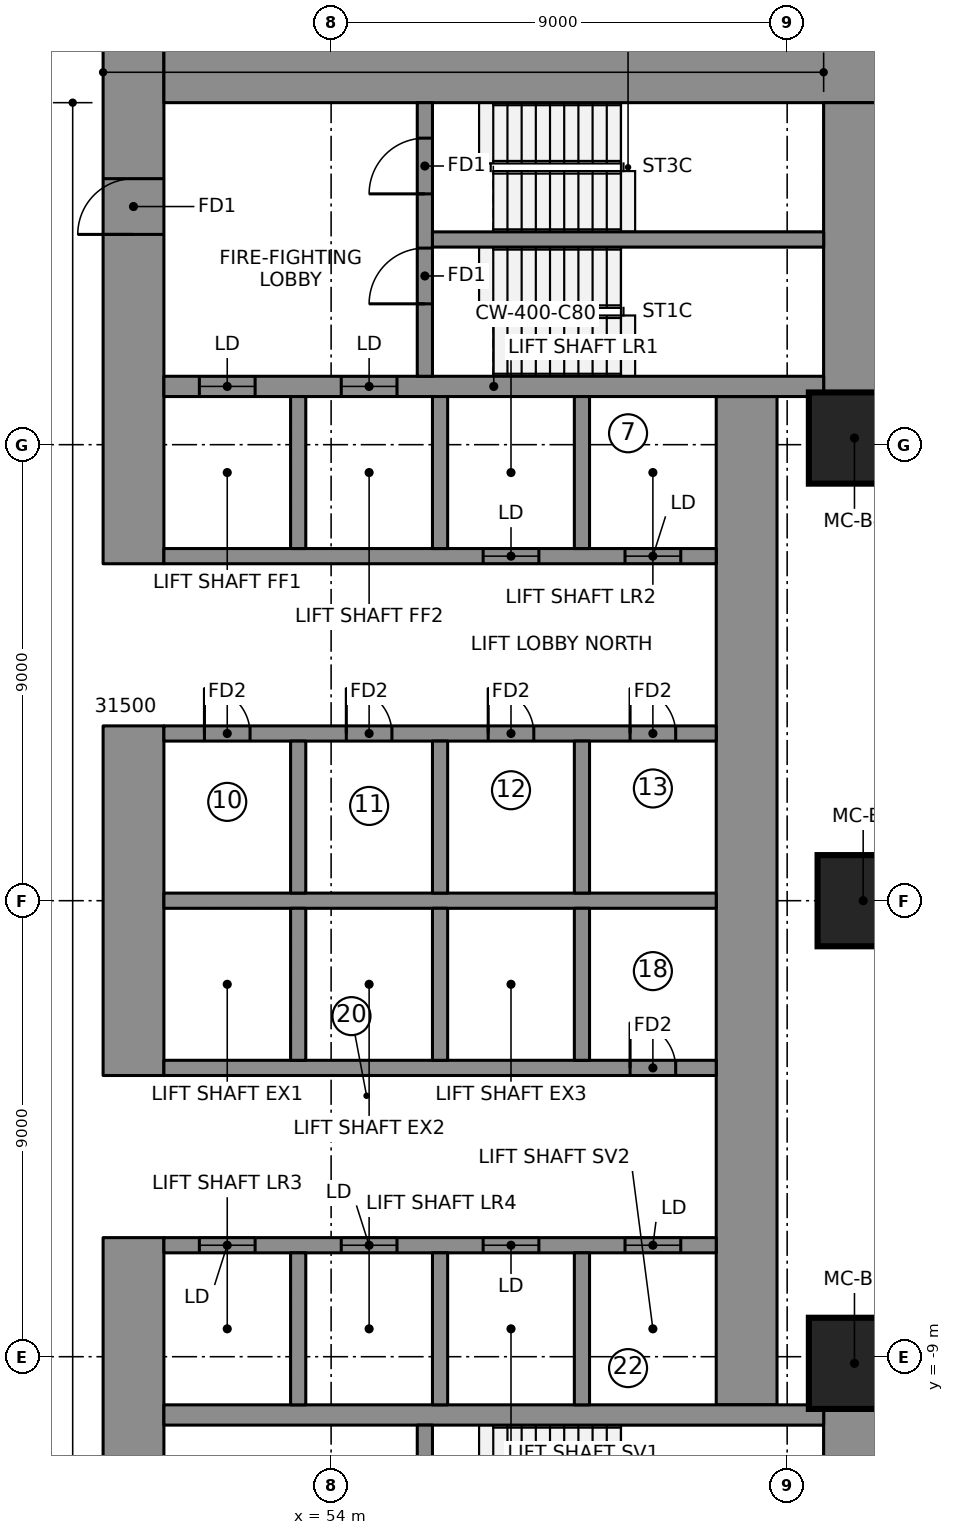
"""IFC4 building model, lengths in metres.
Left out: names, types, materials, properties, quantities, classifications, styles, units other than length and angle.
Written with IfcOpenShell. Run it as: python <this file> out.ifc"""

import sys

from ifc_helpers import new_model, si_unit, direction, frame, frame_2d, origin, origin_2d, place, context, subcontext, project, spatial, rectangle, extrude, element, fill, save


model = new_model("IFC4")
c1 = context("Model", 3, precision=1e-05, world=origin(), true_north=direction((0.0, 1.0)))
c2 = subcontext(c1, "Body", "Model", "MODEL_VIEW")
j1 = project(units=[si_unit("LENGTHUNIT", "METRE"), si_unit("PLANEANGLEUNIT", "RADIAN")], contexts=[c1])
p1 = place(None, origin())
s1 = spatial("IfcSite", under=j1, at=p1, CompositionType="ELEMENT")
p2 = place(p1, origin())
s2 = spatial("IfcBuilding", under=s1, at=p2, CompositionType="ELEMENT")
p3 = place(p2, frame((0.0, 0.0, 60.9)))
s3 = spatial("IfcBuildingStorey", under=s2, at=p3, CompositionType="ELEMENT", Elevation=60.9)
p4 = place(p3, frame((50.1, 6.65, 0.0), z_axis=(0.0, 0.0, 1.0), x_axis=(0.0, 1.0, 0.0)))
e1 = element("IfcWall", 1, at=p4, inside=s3, PredefinedType="SHEAR", context=c2, shape_type="SweptSolid", body=[
    extrude(rectangle(XDim=10.3, YDim=1.2, at=frame_2d((5.15, 0.0))), origin(), (0.0, 0.0, 1.0), 3.55),
])
p5 = place(p4, frame((6.5, 0.0, 0.0)))
e2 = element("IfcOpeningElement", 2, at=p5, cuts=e1, PredefinedType="OPENING", context=c2, shape_type="SweptSolid", body=[
    extrude(rectangle(XDim=1.1, YDim=2.1, at=frame_2d((0.55, 1.05))), frame((0.0, 0.61, 0.0), z_axis=(0.0, -1.0, 0.0), x_axis=(1.0, 0.0, 0.0)), (0.0, 0.0, 1.0), 1.22),
])
p6 = place(p3, frame((50.1, -3.45, 0.0), z_axis=(0.0, 0.0, 1.0), x_axis=(0.0, 1.0, 0.0)))
e3 = element("IfcWall", 3, at=p6, inside=s3, PredefinedType="SHEAR", context=c2, shape_type="SweptSolid", body=[
    extrude(rectangle(XDim=6.9, YDim=1.2, at=frame_2d((3.45, 0.0))), origin(), (0.0, 0.0, 1.0), 3.55),
])
p7 = place(p3, frame((50.1, -16.95, 0.0), z_axis=(0.0, 0.0, 1.0), x_axis=(0.0, 1.0, 0.0)))
e4 = element("IfcWall", 4, at=p7, inside=s3, PredefinedType="SHEAR", context=c2, shape_type="SweptSolid", body=[
    extrude(rectangle(XDim=10.3, YDim=1.2, at=frame_2d((5.15, 0.0))), origin(), (0.0, 0.0, 1.0), 3.55),
])
p8 = place(p7, frame((2.7, 0.0, 0.0)))
e5 = element("IfcOpeningElement", 5, at=p8, cuts=e4, PredefinedType="OPENING", context=c2, shape_type="SweptSolid", body=[
    extrude(rectangle(XDim=1.1, YDim=2.1, at=frame_2d((0.55, 1.05))), frame((0.0, 0.61, 0.0), z_axis=(0.0, -1.0, 0.0), x_axis=(1.0, 0.0, 0.0)), (0.0, 0.0, 1.0), 1.22),
])
p9 = place(p3, frame((50.7, 16.35, 0.0), z_axis=(0.0, 0.0, 1.0), x_axis=(1.0, 0.0, 0.0)))
e6 = element("IfcWall", 6, at=p9, inside=s3, PredefinedType="SHEAR", context=c2, shape_type="SweptSolid", body=[
    extrude(rectangle(XDim=14.22, YDim=1.2, at=frame_2d((7.11, 0.0))), origin(), (0.0, 0.0, 1.0), 3.55),
])
for number, where, z_axis, x_axis in (
    (7, (64.32, 9.95, 0.0), (0.0, 0.0, 1.0), (0.0, 1.0, 0.0)),
    (8, (64.32, -15.75, 0.0), (0.0, 0.0, 1.0), (0.0, 1.0, 0.0)),
):
    element("IfcWall", number, at=place(p3, frame(where, z_axis=z_axis, x_axis=x_axis)), inside=s3, PredefinedType="SHEAR", context=c2, shape_type="SweptSolid", body=[
        extrude(rectangle(XDim=5.8, YDim=1.2, at=frame_2d((2.9, 0.0))), origin(), (0.0, 0.0, 1.0), 3.55),
    ])
p10 = place(p3, frame((62.2, -9.95, 0.0), z_axis=(0.0, 0.0, 1.0), x_axis=(0.0, 1.0, 0.0)))
e9 = element("IfcWall", 9, at=p10, inside=s3, PredefinedType="SHEAR", context=c2, shape_type="SweptSolid", body=[
    extrude(rectangle(XDim=19.9, YDim=1.2, at=frame_2d((9.95, 0.0))), origin(), (0.0, 0.0, 1.0), 3.55),
])
p11 = place(p3, frame((50.7, 10.15, 0.0), z_axis=(0.0, 0.0, 1.0), x_axis=(1.0, 0.0, 0.0)))
e10 = element("IfcWall", 10, at=p11, inside=s3, PredefinedType="SHEAR", context=c2, shape_type="SweptSolid", body=[
    extrude(rectangle(XDim=13.02, YDim=0.4, at=frame_2d((6.51, 0.0))), origin(), (0.0, 0.0, 1.0), 3.55),
])
p12 = place(p11, frame((0.7, 0.0, 0.0)))
e11 = element("IfcOpeningElement", 11, at=p12, cuts=e10, PredefinedType="OPENING", context=c2, shape_type="SweptSolid", body=[
    extrude(rectangle(XDim=1.1, YDim=2.1, at=frame_2d((0.55, 1.05))), frame((0.0, 0.21, 0.0), z_axis=(0.0, -1.0, 0.0), x_axis=(1.0, 0.0, 0.0)), (0.0, 0.0, 1.0), 0.42),
])
p13 = place(p11, frame((3.5, 0.0, 0.0)))
e12 = element("IfcOpeningElement", 12, at=p13, cuts=e10, PredefinedType="OPENING", context=c2, shape_type="SweptSolid", body=[
    extrude(rectangle(XDim=1.1, YDim=2.1, at=frame_2d((0.55, 1.05))), frame((0.0, 0.21, 0.0), z_axis=(0.0, -1.0, 0.0), x_axis=(1.0, 0.0, 0.0)), (0.0, 0.0, 1.0), 0.42),
])
p14 = place(p3, frame((50.7, -10.15, 0.0), z_axis=(0.0, 0.0, 1.0), x_axis=(1.0, 0.0, 0.0)))
e13 = element("IfcWall", 13, at=p14, inside=s3, PredefinedType="SHEAR", context=c2, shape_type="SweptSolid", body=[
    extrude(rectangle(XDim=13.02, YDim=0.4, at=frame_2d((6.51, 0.0))), origin(), (0.0, 0.0, 1.0), 3.55),
])
p15 = place(p3, frame((50.7, 0.0, 0.0), z_axis=(0.0, 0.0, 1.0), x_axis=(1.0, 0.0, 0.0)))
e14 = element("IfcWall", 14, at=p15, inside=s3, PredefinedType="SHEAR", context=c2, shape_type="SweptSolid", body=[
    extrude(rectangle(XDim=10.9, YDim=0.3, at=frame_2d((5.45, 0.0))), origin(), (0.0, 0.0, 1.0), 3.55),
])
p16 = place(p3, frame((50.7, 3.3, 0.0), z_axis=(0.0, 0.0, 1.0), x_axis=(1.0, 0.0, 0.0)))
e15 = element("IfcWall", 15, at=p16, inside=s3, PredefinedType="SHEAR", context=c2, shape_type="SweptSolid", body=[
    extrude(rectangle(XDim=10.9, YDim=0.3, at=frame_2d((5.45, 0.0))), origin(), (0.0, 0.0, 1.0), 3.55),
])
p17 = place(p16, frame((0.8, 0.0, 0.0)))
e16 = element("IfcOpeningElement", 16, at=p17, cuts=e15, PredefinedType="OPENING", context=c2, shape_type="SweptSolid", body=[
    extrude(rectangle(XDim=0.9, YDim=2.1, at=frame_2d((0.45, 1.05))), frame((0.0, 0.16, 0.0), z_axis=(0.0, -1.0, 0.0), x_axis=(1.0, 0.0, 0.0)), (0.0, 0.0, 1.0), 0.32),
])
p18 = place(p16, frame((3.6, 0.0, 0.0)))
e17 = element("IfcOpeningElement", 17, at=p18, cuts=e15, PredefinedType="OPENING", context=c2, shape_type="SweptSolid", body=[
    extrude(rectangle(XDim=0.9, YDim=2.1, at=frame_2d((0.45, 1.05))), frame((0.0, 0.16, 0.0), z_axis=(0.0, -1.0, 0.0), x_axis=(1.0, 0.0, 0.0)), (0.0, 0.0, 1.0), 0.32),
])
p19 = place(p16, frame((6.4, 0.0, 0.0)))
e18 = element("IfcOpeningElement", 18, at=p19, cuts=e15, PredefinedType="OPENING", context=c2, shape_type="SweptSolid", body=[
    extrude(rectangle(XDim=0.9, YDim=2.1, at=frame_2d((0.45, 1.05))), frame((0.0, 0.16, 0.0), z_axis=(0.0, -1.0, 0.0), x_axis=(1.0, 0.0, 0.0)), (0.0, 0.0, 1.0), 0.32),
])
p20 = place(p16, frame((9.2, 0.0, 0.0)))
e19 = element("IfcOpeningElement", 19, at=p20, cuts=e15, PredefinedType="OPENING", context=c2, shape_type="SweptSolid", body=[
    extrude(rectangle(XDim=0.9, YDim=2.1, at=frame_2d((0.45, 1.05))), frame((0.0, 0.16, 0.0), z_axis=(0.0, -1.0, 0.0), x_axis=(1.0, 0.0, 0.0)), (0.0, 0.0, 1.0), 0.32),
])
p21 = place(p3, frame((50.7, 6.8, 0.0), z_axis=(0.0, 0.0, 1.0), x_axis=(1.0, 0.0, 0.0)))
e20 = element("IfcWall", 20, at=p21, inside=s3, PredefinedType="SHEAR", context=c2, shape_type="SweptSolid", body=[
    extrude(rectangle(XDim=10.9, YDim=0.3, at=frame_2d((5.45, 0.0))), origin(), (0.0, 0.0, 1.0), 3.55),
])
p22 = place(p21, frame((6.3, 0.0, 0.0)))
e21 = element("IfcOpeningElement", 21, at=p22, cuts=e20, PredefinedType="OPENING", context=c2, shape_type="SweptSolid", body=[
    extrude(rectangle(XDim=1.1, YDim=2.1, at=frame_2d((0.55, 1.05))), frame((0.0, 0.16, 0.0), z_axis=(0.0, -1.0, 0.0), x_axis=(1.0, 0.0, 0.0)), (0.0, 0.0, 1.0), 0.32),
])
p23 = place(p21, frame((9.1, 0.0, 0.0)))
e22 = element("IfcOpeningElement", 22, at=p23, cuts=e20, PredefinedType="OPENING", context=c2, shape_type="SweptSolid", body=[
    extrude(rectangle(XDim=1.1, YDim=2.1, at=frame_2d((0.55, 1.05))), frame((0.0, 0.16, 0.0), z_axis=(0.0, -1.0, 0.0), x_axis=(1.0, 0.0, 0.0)), (0.0, 0.0, 1.0), 0.32),
])
for number, where, z_axis, x_axis in (
    (23, (53.35, 0.15, 0.0), (0.0, 0.0, 1.0), (0.0, 1.0, 0.0)),
    (24, (53.35, 6.95, 0.0), (0.0, 0.0, 1.0), (0.0, 1.0, 0.0)),
    (25, (56.15, 0.15, 0.0), (0.0, 0.0, 1.0), (0.0, 1.0, 0.0)),
    (26, (56.15, 6.95, 0.0), (0.0, 0.0, 1.0), (0.0, 1.0, 0.0)),
    (27, (58.95, 0.15, 0.0), (0.0, 0.0, 1.0), (0.0, 1.0, 0.0)),
    (28, (58.95, 6.95, 0.0), (0.0, 0.0, 1.0), (0.0, 1.0, 0.0)),
):
    element("IfcWall", number, at=place(p3, frame(where, z_axis=z_axis, x_axis=x_axis)), inside=s3, PredefinedType="SHEAR", context=c2, shape_type="SweptSolid", body=[
        extrude(rectangle(XDim=3.0, YDim=0.3, at=frame_2d((1.5, 0.0))), origin(), (0.0, 0.0, 1.0), 3.55),
    ])
p24 = place(p3, frame((50.7, -3.3, 0.0), z_axis=(0.0, 0.0, 1.0), x_axis=(1.0, 0.0, 0.0)))
e29 = element("IfcWall", 29, at=p24, inside=s3, PredefinedType="SHEAR", context=c2, shape_type="SweptSolid", body=[
    extrude(rectangle(XDim=10.9, YDim=0.3, at=frame_2d((5.45, 0.0))), origin(), (0.0, 0.0, 1.0), 3.55),
])
p25 = place(p24, frame((9.2, 0.0, 0.0)))
e30 = element("IfcOpeningElement", 30, at=p25, cuts=e29, PredefinedType="OPENING", context=c2, shape_type="SweptSolid", body=[
    extrude(rectangle(XDim=0.9, YDim=2.1, at=frame_2d((0.45, 1.05))), frame((0.0, 0.16, 0.0), z_axis=(0.0, -1.0, 0.0), x_axis=(1.0, 0.0, 0.0)), (0.0, 0.0, 1.0), 0.32),
])
p26 = place(p3, frame((50.7, -6.8, 0.0), z_axis=(0.0, 0.0, 1.0), x_axis=(1.0, 0.0, 0.0)))
e31 = element("IfcWall", 31, at=p26, inside=s3, PredefinedType="SHEAR", context=c2, shape_type="SweptSolid", body=[
    extrude(rectangle(XDim=10.9, YDim=0.3, at=frame_2d((5.45, 0.0))), origin(), (0.0, 0.0, 1.0), 3.55),
])
p27 = place(p26, frame((0.7, 0.0, 0.0)))
e32 = element("IfcOpeningElement", 32, at=p27, cuts=e31, PredefinedType="OPENING", context=c2, shape_type="SweptSolid", body=[
    extrude(rectangle(XDim=1.1, YDim=2.1, at=frame_2d((0.55, 1.05))), frame((0.0, 0.16, 0.0), z_axis=(0.0, -1.0, 0.0), x_axis=(1.0, 0.0, 0.0)), (0.0, 0.0, 1.0), 0.32),
])
p28 = place(p26, frame((3.5, 0.0, 0.0)))
e33 = element("IfcOpeningElement", 33, at=p28, cuts=e31, PredefinedType="OPENING", context=c2, shape_type="SweptSolid", body=[
    extrude(rectangle(XDim=1.1, YDim=2.1, at=frame_2d((0.55, 1.05))), frame((0.0, 0.16, 0.0), z_axis=(0.0, -1.0, 0.0), x_axis=(1.0, 0.0, 0.0)), (0.0, 0.0, 1.0), 0.32),
])
p29 = place(p26, frame((6.3, 0.0, 0.0)))
e34 = element("IfcOpeningElement", 34, at=p29, cuts=e31, PredefinedType="OPENING", context=c2, shape_type="SweptSolid", body=[
    extrude(rectangle(XDim=1.1, YDim=2.1, at=frame_2d((0.55, 1.05))), frame((0.0, 0.16, 0.0), z_axis=(0.0, -1.0, 0.0), x_axis=(1.0, 0.0, 0.0)), (0.0, 0.0, 1.0), 0.32),
])
p30 = place(p26, frame((9.1, 0.0, 0.0)))
e35 = element("IfcOpeningElement", 35, at=p30, cuts=e31, PredefinedType="OPENING", context=c2, shape_type="SweptSolid", body=[
    extrude(rectangle(XDim=1.1, YDim=2.1, at=frame_2d((0.55, 1.05))), frame((0.0, 0.16, 0.0), z_axis=(0.0, -1.0, 0.0), x_axis=(1.0, 0.0, 0.0)), (0.0, 0.0, 1.0), 0.32),
])
for number, where, z_axis, x_axis in (
    (36, (53.35, -3.15, 0.0), (0.0, 0.0, 1.0), (0.0, 1.0, 0.0)),
    (37, (53.35, -9.95, 0.0), (0.0, 0.0, 1.0), (0.0, 1.0, 0.0)),
    (38, (56.15, -3.15, 0.0), (0.0, 0.0, 1.0), (0.0, 1.0, 0.0)),
    (39, (56.15, -9.95, 0.0), (0.0, 0.0, 1.0), (0.0, 1.0, 0.0)),
    (40, (58.95, -3.15, 0.0), (0.0, 0.0, 1.0), (0.0, 1.0, 0.0)),
    (41, (58.95, -9.95, 0.0), (0.0, 0.0, 1.0), (0.0, 1.0, 0.0)),
):
    element("IfcWall", number, at=place(p3, frame(where, z_axis=z_axis, x_axis=x_axis)), inside=s3, PredefinedType="SHEAR", context=c2, shape_type="SweptSolid", body=[
        extrude(rectangle(XDim=3.0, YDim=0.3, at=frame_2d((1.5, 0.0))), origin(), (0.0, 0.0, 1.0), 3.55),
    ])
p31 = place(p3, frame((55.85, 10.35, 0.0), z_axis=(0.0, 0.0, 1.0), x_axis=(0.0, 1.0, 0.0)))
e42 = element("IfcWall", 42, at=p31, inside=s3, PredefinedType="SHEAR", context=c2, shape_type="SweptSolid", body=[
    extrude(rectangle(XDim=5.4, YDim=0.3, at=frame_2d((2.7, 0.0))), origin(), (0.0, 0.0, 1.0), 3.55),
])
p32 = place(p31, frame((1.43, 0.0, 0.0)))
e43 = element("IfcOpeningElement", 43, at=p32, cuts=e42, PredefinedType="OPENING", context=c2, shape_type="SweptSolid", body=[
    extrude(rectangle(XDim=1.1, YDim=2.1, at=frame_2d((0.55, 1.05))), frame((0.0, 0.16, 0.0), z_axis=(0.0, -1.0, 0.0), x_axis=(1.0, 0.0, 0.0)), (0.0, 0.0, 1.0), 0.32),
])
p33 = place(p31, frame((3.6, 0.0, 0.0)))
e44 = element("IfcOpeningElement", 44, at=p33, cuts=e42, PredefinedType="OPENING", context=c2, shape_type="SweptSolid", body=[
    extrude(rectangle(XDim=1.1, YDim=2.1, at=frame_2d((0.55, 1.05))), frame((0.0, 0.16, 0.0), z_axis=(0.0, -1.0, 0.0), x_axis=(1.0, 0.0, 0.0)), (0.0, 0.0, 1.0), 0.32),
])
p34 = place(p3, frame((55.85, -15.75, 0.0), z_axis=(0.0, 0.0, 1.0), x_axis=(0.0, 1.0, 0.0)))
e45 = element("IfcWall", 45, at=p34, inside=s3, PredefinedType="SHEAR", context=c2, shape_type="SweptSolid", body=[
    extrude(rectangle(XDim=5.4, YDim=0.3, at=frame_2d((2.7, 0.0))), origin(), (0.0, 0.0, 1.0), 3.55),
])
p35 = place(p34, frame((3.6, 0.0, 0.0)))
e46 = element("IfcOpeningElement", 46, at=p35, cuts=e45, PredefinedType="OPENING", context=c2, shape_type="SweptSolid", body=[
    extrude(rectangle(XDim=1.1, YDim=2.1, at=frame_2d((0.55, 1.05))), frame((0.0, 0.16, 0.0), z_axis=(0.0, -1.0, 0.0), x_axis=(1.0, 0.0, 0.0)), (0.0, 0.0, 1.0), 0.32),
])
p36 = place(p34, frame((0.8, 0.0, 0.0)))
e47 = element("IfcOpeningElement", 47, at=p36, cuts=e45, PredefinedType="OPENING", context=c2, shape_type="SweptSolid", body=[
    extrude(rectangle(XDim=0.9, YDim=2.1, at=frame_2d((0.45, 1.05))), frame((0.0, 0.16, 0.0), z_axis=(0.0, -1.0, 0.0), x_axis=(1.0, 0.0, 0.0)), (0.0, 0.0, 1.0), 0.32),
])
p37 = place(p3, frame((56.0, 13.05, 0.0), z_axis=(0.0, 0.0, 1.0), x_axis=(1.0, 0.0, 0.0)))
e48 = element("IfcWall", 48, at=p37, inside=s3, PredefinedType="SHEAR", context=c2, shape_type="SweptSolid", body=[
    extrude(rectangle(XDim=7.72, YDim=0.3, at=frame_2d((3.86, 0.0))), origin(), (0.0, 0.0, 1.0), 3.55),
])
for number, where, z_axis, x_axis in (
    (49, (64.328, -9.131, 0.0), (0.0, 0.0, 1.0), (1.0, 0.0, 0.0)),
    (50, (64.5, 0.0, 0.0), (0.0, 0.0, 1.0), (1.0, 0.0, 0.0)),
    (51, (64.328, 9.131, 0.0), (0.0, 0.0, 1.0), (1.0, 0.0, 0.0)),
):
    element("IfcColumn", number, at=place(p3, frame(where, z_axis=z_axis, x_axis=x_axis)), inside=s3, PredefinedType="COLUMN", context=c2, shape_type="SweptSolid", body=[
        extrude(rectangle(XDim=1.8, YDim=1.8, at=origin_2d()), origin(), (0.0, 0.0, 1.0), 3.55),
    ])
p38 = place(p12, origin())
e52 = element("IfcDoor", 52, at=p38, inside=s3, OperationType="DOUBLE_DOOR_SLIDING", PredefinedType="DOOR", context=c2, shape_type="SweptSolid", body=[
    extrude(rectangle(XDim=1.1, YDim=2.1, at=frame_2d((0.55, 1.05))), frame((0.0, 0.025, 0.0), z_axis=(0.0, -1.0, 0.0), x_axis=(1.0, 0.0, 0.0)), (0.0, 0.0, 1.0), 0.05),
])
fill(e11, e52)
p39 = place(p13, origin())
e53 = element("IfcDoor", 53, at=p39, inside=s3, OperationType="DOUBLE_DOOR_SLIDING", PredefinedType="DOOR", context=c2, shape_type="SweptSolid", body=[
    extrude(rectangle(XDim=1.1, YDim=2.1, at=frame_2d((0.55, 1.05))), frame((0.0, 0.025, 0.0), z_axis=(0.0, -1.0, 0.0), x_axis=(1.0, 0.0, 0.0)), (0.0, 0.0, 1.0), 0.05),
])
fill(e12, e53)
p40 = place(p22, origin())
e54 = element("IfcDoor", 54, at=p40, inside=s3, OperationType="DOUBLE_DOOR_SLIDING", PredefinedType="DOOR", context=c2, shape_type="SweptSolid", body=[
    extrude(rectangle(XDim=1.1, YDim=2.1, at=frame_2d((0.55, 1.05))), frame((0.0, 0.025, 0.0), z_axis=(0.0, -1.0, 0.0), x_axis=(1.0, 0.0, 0.0)), (0.0, 0.0, 1.0), 0.05),
])
fill(e21, e54)
p41 = place(p23, origin())
e55 = element("IfcDoor", 55, at=p41, inside=s3, OperationType="DOUBLE_DOOR_SLIDING", PredefinedType="DOOR", context=c2, shape_type="SweptSolid", body=[
    extrude(rectangle(XDim=1.1, YDim=2.1, at=frame_2d((0.55, 1.05))), frame((0.0, 0.025, 0.0), z_axis=(0.0, -1.0, 0.0), x_axis=(1.0, 0.0, 0.0)), (0.0, 0.0, 1.0), 0.05),
])
fill(e22, e55)
p42 = place(p27, origin())
e56 = element("IfcDoor", 56, at=p42, inside=s3, OperationType="DOUBLE_DOOR_SLIDING", PredefinedType="DOOR", context=c2, shape_type="SweptSolid", body=[
    extrude(rectangle(XDim=1.1, YDim=2.1, at=frame_2d((0.55, 1.05))), frame((0.0, 0.025, 0.0), z_axis=(0.0, -1.0, 0.0), x_axis=(1.0, 0.0, 0.0)), (0.0, 0.0, 1.0), 0.05),
])
fill(e32, e56)
p43 = place(p28, origin())
e57 = element("IfcDoor", 57, at=p43, inside=s3, OperationType="DOUBLE_DOOR_SLIDING", PredefinedType="DOOR", context=c2, shape_type="SweptSolid", body=[
    extrude(rectangle(XDim=1.1, YDim=2.1, at=frame_2d((0.55, 1.05))), frame((0.0, 0.025, 0.0), z_axis=(0.0, -1.0, 0.0), x_axis=(1.0, 0.0, 0.0)), (0.0, 0.0, 1.0), 0.05),
])
fill(e33, e57)
p44 = place(p29, origin())
e58 = element("IfcDoor", 58, at=p44, inside=s3, OperationType="DOUBLE_DOOR_SLIDING", PredefinedType="DOOR", context=c2, shape_type="SweptSolid", body=[
    extrude(rectangle(XDim=1.1, YDim=2.1, at=frame_2d((0.55, 1.05))), frame((0.0, 0.025, 0.0), z_axis=(0.0, -1.0, 0.0), x_axis=(1.0, 0.0, 0.0)), (0.0, 0.0, 1.0), 0.05),
])
fill(e34, e58)
p45 = place(p30, origin())
e59 = element("IfcDoor", 59, at=p45, inside=s3, OperationType="DOUBLE_DOOR_SLIDING", PredefinedType="DOOR", context=c2, shape_type="SweptSolid", body=[
    extrude(rectangle(XDim=1.1, YDim=2.1, at=frame_2d((0.55, 1.05))), frame((0.0, 0.025, 0.0), z_axis=(0.0, -1.0, 0.0), x_axis=(1.0, 0.0, 0.0)), (0.0, 0.0, 1.0), 0.05),
])
fill(e35, e59)
p46 = place(p32, origin())
e60 = element("IfcDoor", 60, at=p46, inside=s3, OperationType="SINGLE_SWING_RIGHT", PredefinedType="DOOR", context=c2, shape_type="SweptSolid", body=[
    extrude(rectangle(XDim=1.1, YDim=2.1, at=frame_2d((0.55, 1.05))), frame((0.0, 0.025, 0.0), z_axis=(0.0, -1.0, 0.0), x_axis=(1.0, 0.0, 0.0)), (0.0, 0.0, 1.0), 0.05),
])
fill(e43, e60)
p47 = place(p33, origin())
e61 = element("IfcDoor", 61, at=p47, inside=s3, OperationType="SINGLE_SWING_RIGHT", PredefinedType="DOOR", context=c2, shape_type="SweptSolid", body=[
    extrude(rectangle(XDim=1.1, YDim=2.1, at=frame_2d((0.55, 1.05))), frame((0.0, 0.025, 0.0), z_axis=(0.0, -1.0, 0.0), x_axis=(1.0, 0.0, 0.0)), (0.0, 0.0, 1.0), 0.05),
])
fill(e44, e61)
p48 = place(p5, origin())
e62 = element("IfcDoor", 62, at=p48, inside=s3, OperationType="SINGLE_SWING_RIGHT", PredefinedType="DOOR", context=c2, shape_type="SweptSolid", body=[
    extrude(rectangle(XDim=1.1, YDim=2.1, at=frame_2d((0.55, 1.05))), frame((0.0, 0.025, 0.0), z_axis=(0.0, -1.0, 0.0), x_axis=(1.0, 0.0, 0.0)), (0.0, 0.0, 1.0), 0.05),
])
fill(e2, e62)
p49 = place(p17, origin())
e63 = element("IfcDoor", 63, at=p49, inside=s3, OperationType="SINGLE_SWING_LEFT", PredefinedType="DOOR", context=c2, shape_type="SweptSolid", body=[
    extrude(rectangle(XDim=0.9, YDim=2.1, at=frame_2d((0.45, 1.05))), frame((0.0, 0.025, 0.0), z_axis=(0.0, -1.0, 0.0), x_axis=(1.0, 0.0, 0.0)), (0.0, 0.0, 1.0), 0.05),
])
fill(e16, e63)
p50 = place(p18, origin())
e64 = element("IfcDoor", 64, at=p50, inside=s3, OperationType="SINGLE_SWING_LEFT", PredefinedType="DOOR", context=c2, shape_type="SweptSolid", body=[
    extrude(rectangle(XDim=0.9, YDim=2.1, at=frame_2d((0.45, 1.05))), frame((0.0, 0.025, 0.0), z_axis=(0.0, -1.0, 0.0), x_axis=(1.0, 0.0, 0.0)), (0.0, 0.0, 1.0), 0.05),
])
fill(e17, e64)
p51 = place(p19, origin())
e65 = element("IfcDoor", 65, at=p51, inside=s3, OperationType="SINGLE_SWING_LEFT", PredefinedType="DOOR", context=c2, shape_type="SweptSolid", body=[
    extrude(rectangle(XDim=0.9, YDim=2.1, at=frame_2d((0.45, 1.05))), frame((0.0, 0.025, 0.0), z_axis=(0.0, -1.0, 0.0), x_axis=(1.0, 0.0, 0.0)), (0.0, 0.0, 1.0), 0.05),
])
fill(e18, e65)
p52 = place(p20, origin())
e66 = element("IfcDoor", 66, at=p52, inside=s3, OperationType="SINGLE_SWING_LEFT", PredefinedType="DOOR", context=c2, shape_type="SweptSolid", body=[
    extrude(rectangle(XDim=0.9, YDim=2.1, at=frame_2d((0.45, 1.05))), frame((0.0, 0.025, 0.0), z_axis=(0.0, -1.0, 0.0), x_axis=(1.0, 0.0, 0.0)), (0.0, 0.0, 1.0), 0.05),
])
fill(e19, e66)
p53 = place(p25, origin())
e67 = element("IfcDoor", 67, at=p53, inside=s3, OperationType="SINGLE_SWING_LEFT", PredefinedType="DOOR", context=c2, shape_type="SweptSolid", body=[
    extrude(rectangle(XDim=0.9, YDim=2.1, at=frame_2d((0.45, 1.05))), frame((0.0, 0.025, 0.0), z_axis=(0.0, -1.0, 0.0), x_axis=(1.0, 0.0, 0.0)), (0.0, 0.0, 1.0), 0.05),
])
fill(e30, e67)
save(model, sys.argv[1])
